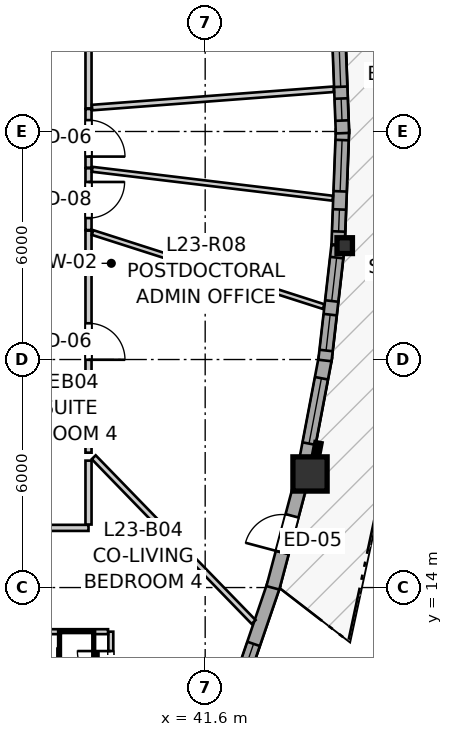
"""IFC4 building model, lengths in metres.
Left out: names, types, materials, properties, quantities, classifications, styles, units other than length and angle.
Written with IfcOpenShell. Run it as: python <this file> out.ifc"""

import sys

from ifc_helpers import new_model, si_unit, direction, frame, frame_2d, origin, origin_2d, place, context, subcontext, project, spatial, rectangle, i_section, extrude, source, transform, mapped, element, fill, save


model = new_model("IFC4")
c1 = context("Model", 3, precision=1e-05, world=origin(), true_north=direction((0.0, 1.0)))
c2 = subcontext(c1, "Body", "Model", "MODEL_VIEW")
j1 = project(units=[si_unit("LENGTHUNIT", "METRE"), si_unit("PLANEANGLEUNIT", "RADIAN")], contexts=[c1])
p1 = place(None, origin())
s1 = spatial("IfcSite", under=j1, at=p1, CompositionType="ELEMENT")
p2 = place(p1, origin())
s2 = spatial("IfcBuilding", under=s1, at=p2, CompositionType="ELEMENT")
p3 = place(p2, frame((0.0, 0.0, 80.0)))
s3 = spatial("IfcBuildingStorey", under=s2, at=p3, CompositionType="ELEMENT", Elevation=80.0)
m1 = source(origin(), c2, "Body", "SweptSolid", [
    extrude(rectangle(XDim=0.9, YDim=0.9, at=origin_2d()), origin(), (0.0, 0.0, 1.0), 2.935),
])
p4 = place(p3, frame((44.359, 16.989, 0.0), z_axis=(0.0, 0.0, 1.0), x_axis=(1.0, 0.0, 0.0)))
e1 = element("IfcColumn", 1, at=p4, inside=s3, PredefinedType="COLUMN", context=c2, shape_type="MappedRepresentation", body=[
    mapped(m1, transform((0.0, 0.0, 0.0), x_axis=(1.0, 0.0, 0.0), y_axis=(0.0, 1.0, 0.0), z_axis=(0.0, 0.0, 1.0), scale=1.0)),
])
m2 = source(origin(), c2, "Body", "SweptSolid", [
    extrude(i_section(OverallWidth=0.406, OverallDepth=0.416, WebThickness=0.027, FlangeThickness=0.044, FilletRadius=0.015, at=origin_2d()), origin(), (0.0, 0.0, 1.0), 2.935),
])
p5 = place(p3, frame((45.272, 22.996, 0.0), z_axis=(0.0, 0.0, 1.0), x_axis=(1.0, 0.0, 0.0)))
e2 = element("IfcColumn", 2, at=p5, inside=s3, PredefinedType="PILASTER", context=c2, shape_type="MappedRepresentation", body=[
    mapped(m2, transform((0.0, 0.0, 0.0), x_axis=(1.0, 0.0, 0.0), y_axis=(0.0, 1.0, 0.0), z_axis=(0.0, 0.0, 1.0), scale=1.0)),
])
p6 = place(p3, frame((42.373, 11.057, 0.0), z_axis=(0.0, 0.0, 1.0), x_axis=(0.323628226775, 0.946184321808, 0.0)))
e3 = element("IfcWall", 3, at=p6, inside=s3, PredefinedType="SOLIDWALL", context=c2, shape_type="SweptSolid", body=[
    extrude(rectangle(XDim=3.193, YDim=0.35, at=frame_2d((1.596, 0.0))), origin(), (0.0, 0.0, 1.0), 2.465),
])
p7 = place(p6, frame((0.595, 0.0, 0.82)))
e4 = element("IfcOpeningElement", 4, at=p7, cuts=e3, PredefinedType="OPENING", context=c2, shape_type="SweptSolid", body=[
    extrude(rectangle(XDim=0.95, YDim=1.35, at=frame_2d((0.475, 0.675))), frame((0.0, 0.185, 0.0), z_axis=(0.0, -1.0, 0.0), x_axis=(1.0, 0.0, 0.0)), (0.0, 0.0, 1.0), 0.37),
])
p8 = place(p3, frame((43.381, 13.993, 0.0), z_axis=(0.0, 0.0, 1.0), x_axis=(0.257079998736, 0.966390125286, 0.0)))
e5 = element("IfcWall", 5, at=p8, inside=s3, PredefinedType="SOLIDWALL", context=c2, shape_type="SweptSolid", body=[
    extrude(rectangle(XDim=2.921, YDim=0.35, at=frame_2d((1.46, 0.0))), origin(), (0.0, 0.0, 1.0), 2.465),
])
p9 = place(p8, frame((0.961, 0.0, 0.0)))
e6 = element("IfcOpeningElement", 6, at=p9, cuts=e5, PredefinedType="OPENING", context=c2, shape_type="SweptSolid", body=[
    extrude(rectangle(XDim=1.0, YDim=2.1, at=frame_2d((0.5, 1.05))), frame((0.0, 0.185, 0.0), z_axis=(0.0, -1.0, 0.0), x_axis=(1.0, 0.0, 0.0)), (0.0, 0.0, 1.0), 0.37),
])
p10 = place(p3, frame((44.229, 17.242, 0.0), z_axis=(0.0, 0.0, 1.0), x_axis=(0.186588413417, 0.982438173107, 0.0)))
e7 = element("IfcWall", 7, at=p10, inside=s3, PredefinedType="SOLIDWALL", context=c2, shape_type="SweptSolid", body=[
    extrude(rectangle(XDim=2.871, YDim=0.35, at=frame_2d((1.436, 0.0))), origin(), (0.0, 0.0, 1.0), 2.465),
])
p11 = place(p10, frame((0.555, 0.0, 0.82)))
e8 = element("IfcOpeningElement", 8, at=p11, cuts=e7, PredefinedType="OPENING", context=c2, shape_type="SweptSolid", body=[
    extrude(rectangle(XDim=1.75, YDim=1.3, at=frame_2d((0.875, 0.65))), frame((0.0, 0.185, 0.0), z_axis=(0.0, -1.0, 0.0), x_axis=(1.0, 0.0, 0.0)), (0.0, 0.0, 1.0), 0.37),
])
p12 = place(p3, frame((44.751, 19.975, 0.0), z_axis=(0.0, 0.0, 1.0), x_axis=(0.113356399423, 0.993554390413, 0.0)))
e9 = element("IfcWall", 9, at=p12, inside=s3, PredefinedType="SOLIDWALL", context=c2, shape_type="SweptSolid", body=[
    extrude(rectangle(XDim=3.041, YDim=0.35, at=frame_2d((1.521, 0.0))), origin(), (0.0, 0.0, 1.0), 2.465),
])
p13 = place(p12, frame((0.264, 0.0, 0.82)))
e10 = element("IfcOpeningElement", 10, at=p13, cuts=e9, PredefinedType="OPENING", context=c2, shape_type="SweptSolid", body=[
    extrude(rectangle(XDim=0.95, YDim=1.35, at=frame_2d((0.475, 0.675))), frame((0.0, 0.185, 0.0), z_axis=(0.0, -1.0, 0.0), x_axis=(1.0, 0.0, 0.0)), (0.0, 0.0, 1.0), 0.37),
])
p14 = place(p12, frame((1.575, 0.0, 0.82)))
e11 = element("IfcOpeningElement", 11, at=p14, cuts=e9, PredefinedType="OPENING", context=c2, shape_type="SweptSolid", body=[
    extrude(rectangle(XDim=1.15, YDim=1.2, at=frame_2d((0.575, 0.6))), frame((0.0, 0.185, 0.0), z_axis=(0.0, -1.0, 0.0), x_axis=(1.0, 0.0, 0.0)), (0.0, 0.0, 1.0), 0.37),
])
p15 = place(p3, frame((45.098, 23.023, 0.0), z_axis=(0.0, 0.0, 1.0), x_axis=(0.037943250197, 0.999279895607, 0.0)))
e12 = element("IfcWall", 12, at=p15, inside=s3, PredefinedType="SOLIDWALL", context=c2, shape_type="SweptSolid", body=[
    extrude(rectangle(XDim=3.024, YDim=0.35, at=frame_2d((1.512, 0.0))), origin(), (0.0, 0.0, 1.0), 2.465),
])
p16 = place(p15, frame((0.346, 0.0, 0.82)))
e13 = element("IfcOpeningElement", 13, at=p16, cuts=e12, PredefinedType="OPENING", context=c2, shape_type="SweptSolid", body=[
    extrude(rectangle(XDim=0.58, YDim=1.35, at=frame_2d((0.29, 0.675))), frame((0.0, 0.185, 0.0), z_axis=(0.0, -1.0, 0.0), x_axis=(1.0, 0.0, 0.0)), (0.0, 0.0, 1.0), 0.37),
])
p17 = place(p15, frame((1.404, 0.0, 0.82)))
e14 = element("IfcOpeningElement", 14, at=p17, cuts=e12, PredefinedType="OPENING", context=c2, shape_type="SweptSolid", body=[
    extrude(rectangle(XDim=1.35, YDim=1.45, at=frame_2d((0.675, 0.725))), frame((0.0, 0.185, 0.0), z_axis=(0.0, -1.0, 0.0), x_axis=(1.0, 0.0, 0.0)), (0.0, 0.0, 1.0), 0.37),
])
p18 = place(p3, frame((45.213, 25.955, 0.0), z_axis=(0.0, 0.0, 1.0), x_axis=(-0.037934195255, 0.999280239388, 0.0)))
e15 = element("IfcWall", 15, at=p18, inside=s3, PredefinedType="SOLIDWALL", context=c2, shape_type="SweptSolid", body=[
    extrude(rectangle(XDim=2.819, YDim=0.35, at=frame_2d((1.409, 0.0))), origin(), (0.0, 0.0, 1.0), 2.465),
])
p19 = place(p18, frame((0.332, 0.0, 0.82)))
e16 = element("IfcOpeningElement", 16, at=p19, cuts=e15, PredefinedType="OPENING", context=c2, shape_type="SweptSolid", body=[
    extrude(rectangle(XDim=0.58, YDim=1.35, at=frame_2d((0.29, 0.675))), frame((0.0, 0.185, 0.0), z_axis=(0.0, -1.0, 0.0), x_axis=(1.0, 0.0, 0.0)), (0.0, 0.0, 1.0), 0.37),
])
p20 = place(p18, frame((1.222, 0.0, 0.82)))
e17 = element("IfcOpeningElement", 17, at=p20, cuts=e15, PredefinedType="OPENING", context=c2, shape_type="SweptSolid", body=[
    extrude(rectangle(XDim=1.15, YDim=1.2, at=frame_2d((0.575, 0.6))), frame((0.0, 0.185, 0.0), z_axis=(0.0, -1.0, 0.0), x_axis=(1.0, 0.0, 0.0)), (0.0, 0.0, 1.0), 0.37),
])
p21 = place(p3, frame((38.53, 23.392, 0.0), z_axis=(0.0, 0.0, 1.0), x_axis=(0.0, -1.0, 0.0)))
e18 = element("IfcWall", 18, at=p21, inside=s3, PredefinedType="PARTITIONING", context=c2, shape_type="SweptSolid", body=[
    extrude(rectangle(XDim=5.843, YDim=0.16, at=frame_2d((2.921, 0.0))), origin(), (0.0, 0.0, 1.0), 2.935),
])
p22 = place(p21, frame((2.438, 0.0, 0.0)))
e19 = element("IfcOpeningElement", 19, at=p22, cuts=e18, PredefinedType="OPENING", context=c2, shape_type="SweptSolid", body=[
    extrude(rectangle(XDim=0.96, YDim=2.1, at=frame_2d((0.48, 1.05))), frame((0.0, 0.09, 0.0), z_axis=(0.0, -1.0, 0.0), x_axis=(1.0, 0.0, 0.0)), (0.0, 0.0, 1.0), 0.18),
])
p23 = place(p3, frame((38.53, 31.856, 0.0), z_axis=(0.0, 0.0, 1.0), x_axis=(0.0, -1.0, 0.0)))
e20 = element("IfcWall", 20, at=p23, inside=s3, PredefinedType="PARTITIONING", context=c2, shape_type="SweptSolid", body=[
    extrude(rectangle(XDim=5.249, YDim=0.16, at=frame_2d((2.625, 0.0))), origin(), (0.0, 0.0, 1.0), 2.935),
])
p24 = place(p23, frame((2.146, 0.0, 0.0)))
e21 = element("IfcOpeningElement", 21, at=p24, cuts=e20, PredefinedType="OPENING", context=c2, shape_type="SweptSolid", body=[
    extrude(rectangle(XDim=0.96, YDim=2.1, at=frame_2d((0.48, 1.05))), frame((0.0, 0.09, 0.0), z_axis=(0.0, -1.0, 0.0), x_axis=(1.0, 0.0, 0.0)), (0.0, 0.0, 1.0), 0.18),
])
p25 = place(p3, frame((38.53, 15.57, 0.0), z_axis=(0.0, 0.0, 1.0), x_axis=(-1.0, 0.0, 0.0)))
e22 = element("IfcWall", 22, at=p25, inside=s3, PredefinedType="PARTITIONING", context=c2, shape_type="SweptSolid", body=[
    extrude(rectangle(XDim=3.257, YDim=0.16, at=frame_2d((1.628, 0.0))), origin(), (0.0, 0.0, 1.0), 2.935),
])
p26 = place(p25, frame((1.16, 0.0, 0.0)))
e23 = element("IfcOpeningElement", 23, at=p26, cuts=e22, PredefinedType="OPENING", context=c2, shape_type="SweptSolid", body=[
    extrude(rectangle(XDim=0.92, YDim=2.1, at=frame_2d((0.46, 1.05))), frame((0.0, 0.09, 0.0), z_axis=(0.0, -1.0, 0.0), x_axis=(1.0, 0.0, 0.0)), (0.0, 0.0, 1.0), 0.18),
])
p27 = place(p3, frame((39.117, 10.939, 0.0), z_axis=(0.0, 0.0, 1.0), x_axis=(0.0, 1.0, 0.0)))
e24 = element("IfcWall", 24, at=p27, inside=s3, PredefinedType="PARTITIONING", context=c2, shape_type="SweptSolid", body=[
    extrude(rectangle(XDim=1.9, YDim=0.13, at=frame_2d((0.95, 0.0))), origin(), (0.0, 0.0, 1.0), 2.935),
])
p28 = place(p27, frame((0.51, 0.0, 0.0)))
e25 = element("IfcOpeningElement", 25, at=p28, cuts=e24, PredefinedType="OPENING", context=c2, shape_type="SweptSolid", body=[
    extrude(rectangle(XDim=0.88, YDim=2.05, at=frame_2d((0.44, 1.025))), frame((0.0, 0.075, 0.0), z_axis=(0.0, -1.0, 0.0), x_axis=(1.0, 0.0, 0.0)), (0.0, 0.0, 1.0), 0.15),
])
p29 = place(p3, frame((38.53, 25.032, 0.0), z_axis=(0.0, 0.0, 1.0), x_axis=(0.0, -1.0, 0.0)))
e26 = element("IfcWall", 26, at=p29, inside=s3, PredefinedType="PARTITIONING", context=c2, shape_type="SweptSolid", body=[
    extrude(rectangle(XDim=1.625, YDim=0.16, at=frame_2d((0.812, 0.0))), origin(), (0.0, 0.0, 1.0), 2.935),
])
p30 = place(p29, frame((0.361, 0.0, 0.0)))
e27 = element("IfcOpeningElement", 27, at=p30, cuts=e26, PredefinedType="OPENING", context=c2, shape_type="SweptSolid", body=[
    extrude(rectangle(XDim=0.95, YDim=2.1, at=frame_2d((0.475, 1.05))), frame((0.0, 0.09, 0.0), z_axis=(0.0, -1.0, 0.0), x_axis=(1.0, 0.0, 0.0)), (0.0, 0.0, 1.0), 0.18),
])
p31 = place(p3, frame((38.53, 26.592, 0.0), z_axis=(0.0, 0.0, 1.0), x_axis=(0.0, -1.0, 0.0)))
e28 = element("IfcWall", 28, at=p31, inside=s3, PredefinedType="PARTITIONING", context=c2, shape_type="SweptSolid", body=[
    extrude(rectangle(XDim=1.545, YDim=0.16, at=frame_2d((0.772, 0.0))), origin(), (0.0, 0.0, 1.0), 2.935),
])
p32 = place(p31, frame((0.292, 0.0, 0.0)))
e29 = element("IfcOpeningElement", 29, at=p32, cuts=e28, PredefinedType="OPENING", context=c2, shape_type="SweptSolid", body=[
    extrude(rectangle(XDim=0.96, YDim=2.1, at=frame_2d((0.48, 1.05))), frame((0.0, 0.09, 0.0), z_axis=(0.0, -1.0, 0.0), x_axis=(1.0, 0.0, 0.0)), (0.0, 0.0, 1.0), 0.18),
])
p33 = place(p3, frame((38.637, 23.342, 0.0), z_axis=(0.0, 0.0, 1.0), x_axis=(0.952253923936, -0.305307163933, 0.0)))
e30 = element("IfcWall", 30, at=p33, inside=s3, PredefinedType="PARTITIONING", context=c2, shape_type="SweptSolid", body=[
    extrude(rectangle(XDim=6.384, YDim=0.13, at=frame_2d((3.192, 0.0))), origin(), (0.0, 0.0, 1.0), 2.935),
])
p34 = place(p3, frame((38.626, 25.006, 0.0), z_axis=(0.0, 0.0, 1.0), x_axis=(0.992837647249, -0.11947136144, 0.0)))
e31 = element("IfcWall", 31, at=p34, inside=s3, PredefinedType="PARTITIONING", context=c2, shape_type="SweptSolid", body=[
    extrude(rectangle(XDim=6.376, YDim=0.13, at=frame_2d((3.188, 0.0))), origin(), (0.0, 0.0, 1.0), 2.935),
])
p35 = place(p3, frame((38.624, 26.629, 0.0), z_axis=(0.0, 0.0, 1.0), x_axis=(0.997137880159, 0.075604549805, 0.0)))
e32 = element("IfcWall", 32, at=p35, inside=s3, PredefinedType="PARTITIONING", context=c2, shape_type="SweptSolid", body=[
    extrude(rectangle(XDim=6.378, YDim=0.145, at=frame_2d((3.189, 0.0))), origin(), (0.0, 0.0, 1.0), 2.935),
])
p36 = place(p3, frame((38.667, 17.429, 0.0), z_axis=(0.0, 0.0, 1.0), x_axis=(0.696417222112, -0.717637131666, 0.0)))
e33 = element("IfcWall", 33, at=p36, inside=s3, PredefinedType="PARTITIONING", context=c2, shape_type="SweptSolid", body=[
    extrude(rectangle(XDim=6.04, YDim=0.145, at=frame_2d((3.02, 0.0))), origin(), (0.0, 0.0, 1.0), 2.935),
])
p37 = place(p3, frame((38.53, 15.658, 0.0), z_axis=(0.0, 0.0, 1.0), x_axis=(0.0, 1.0, 0.0)))
e34 = element("IfcWall", 34, at=p37, inside=s3, PredefinedType="PARTITIONING", context=c2, shape_type="SweptSolid", body=[
    extrude(rectangle(XDim=1.682, YDim=0.16, at=frame_2d((0.841, 0.0))), origin(), (0.0, 0.0, 1.0), 2.935),
])
p38 = place(p3, frame((37.317, 12.839, 0.0), z_axis=(0.0, 0.0, 1.0), x_axis=(1.0, 0.0, 0.0)))
e35 = element("IfcWall", 35, at=p38, inside=s3, PredefinedType="PARTITIONING", context=c2, shape_type="SweptSolid", body=[
    extrude(rectangle(XDim=1.727, YDim=0.13, at=frame_2d((0.864, 0.0))), origin(), (0.0, 0.0, 1.0), 2.935),
])
m3 = source(origin(), c2, "Body", "SweptSolid", [
    extrude(rectangle(XDim=0.95, YDim=1.35, at=frame_2d((0.475, 0.675))), frame((0.0, 0.03, 0.0), z_axis=(0.0, -1.0, 0.0), x_axis=(1.0, 0.0, 0.0)), (0.0, 0.0, 1.0), 0.06),
])
p39 = place(p7, origin())
e36 = element("IfcWindow", 36, at=p39, inside=s3, PartitioningType="SINGLE_PANEL", PredefinedType="WINDOW", context=c2, shape_type="MappedRepresentation", body=[
    mapped(m3, transform((0.0, 0.0, 0.0), x_axis=(1.0, 0.0, 0.0), y_axis=(0.0, 1.0, 0.0), z_axis=(0.0, 0.0, 1.0), scale=1.0)),
])
fill(e4, e36)
m4 = source(origin(), c2, "Body", "SweptSolid", [
    extrude(rectangle(XDim=1.75, YDim=1.3, at=frame_2d((0.875, 0.65))), frame((0.0, 0.03, 0.0), z_axis=(0.0, -1.0, 0.0), x_axis=(1.0, 0.0, 0.0)), (0.0, 0.0, 1.0), 0.06),
])
p40 = place(p11, origin())
e37 = element("IfcWindow", 37, at=p40, inside=s3, PartitioningType="SINGLE_PANEL", PredefinedType="WINDOW", context=c2, shape_type="MappedRepresentation", body=[
    mapped(m4, transform((0.0, 0.0, 0.0), x_axis=(1.0, 0.0, 0.0), y_axis=(0.0, 1.0, 0.0), z_axis=(0.0, 0.0, 1.0), scale=1.0)),
])
fill(e8, e37)
p41 = place(p13, origin())
e38 = element("IfcWindow", 38, at=p41, inside=s3, PartitioningType="SINGLE_PANEL", PredefinedType="WINDOW", context=c2, shape_type="MappedRepresentation", body=[
    mapped(m3, transform((0.0, 0.0, 0.0), x_axis=(1.0, 0.0, 0.0), y_axis=(0.0, 1.0, 0.0), z_axis=(0.0, 0.0, 1.0), scale=1.0)),
])
fill(e10, e38)
m5 = source(origin(), c2, "Body", "SweptSolid", [
    extrude(rectangle(XDim=1.15, YDim=1.2, at=frame_2d((0.575, 0.6))), frame((0.0, 0.03, 0.0), z_axis=(0.0, -1.0, 0.0), x_axis=(1.0, 0.0, 0.0)), (0.0, 0.0, 1.0), 0.06),
])
p42 = place(p14, origin())
e39 = element("IfcWindow", 39, at=p42, inside=s3, PartitioningType="SINGLE_PANEL", PredefinedType="WINDOW", context=c2, shape_type="MappedRepresentation", body=[
    mapped(m5, transform((0.0, 0.0, 0.0), x_axis=(1.0, 0.0, 0.0), y_axis=(0.0, 1.0, 0.0), z_axis=(0.0, 0.0, 1.0), scale=1.0)),
])
fill(e11, e39)
m6 = source(origin(), c2, "Body", "SweptSolid", [
    extrude(rectangle(XDim=0.58, YDim=1.35, at=frame_2d((0.29, 0.675))), frame((0.0, 0.03, 0.0), z_axis=(0.0, -1.0, 0.0), x_axis=(1.0, 0.0, 0.0)), (0.0, 0.0, 1.0), 0.06),
])
p43 = place(p16, origin())
e40 = element("IfcWindow", 40, at=p43, inside=s3, PartitioningType="SINGLE_PANEL", PredefinedType="WINDOW", context=c2, shape_type="MappedRepresentation", body=[
    mapped(m6, transform((0.0, 0.0, 0.0), x_axis=(1.0, 0.0, 0.0), y_axis=(0.0, 1.0, 0.0), z_axis=(0.0, 0.0, 1.0), scale=1.0)),
])
fill(e13, e40)
m7 = source(origin(), c2, "Body", "SweptSolid", [
    extrude(rectangle(XDim=1.35, YDim=1.45, at=frame_2d((0.675, 0.725))), frame((0.0, 0.03, 0.0), z_axis=(0.0, -1.0, 0.0), x_axis=(1.0, 0.0, 0.0)), (0.0, 0.0, 1.0), 0.06),
])
p44 = place(p17, origin())
e41 = element("IfcWindow", 41, at=p44, inside=s3, PartitioningType="SINGLE_PANEL", PredefinedType="WINDOW", context=c2, shape_type="MappedRepresentation", body=[
    mapped(m7, transform((0.0, 0.0, 0.0), x_axis=(1.0, 0.0, 0.0), y_axis=(0.0, 1.0, 0.0), z_axis=(0.0, 0.0, 1.0), scale=1.0)),
])
fill(e14, e41)
p45 = place(p19, origin())
e42 = element("IfcWindow", 42, at=p45, inside=s3, PartitioningType="SINGLE_PANEL", PredefinedType="WINDOW", context=c2, shape_type="MappedRepresentation", body=[
    mapped(m6, transform((0.0, 0.0, 0.0), x_axis=(1.0, 0.0, 0.0), y_axis=(0.0, 1.0, 0.0), z_axis=(0.0, 0.0, 1.0), scale=1.0)),
])
fill(e16, e42)
p46 = place(p20, origin())
e43 = element("IfcWindow", 43, at=p46, inside=s3, PartitioningType="SINGLE_PANEL", PredefinedType="WINDOW", context=c2, shape_type="MappedRepresentation", body=[
    mapped(m5, transform((0.0, 0.0, 0.0), x_axis=(1.0, 0.0, 0.0), y_axis=(0.0, 1.0, 0.0), z_axis=(0.0, 0.0, 1.0), scale=1.0)),
])
fill(e17, e43)
m8 = source(origin(), c2, "Body", "SweptSolid", [
    extrude(rectangle(XDim=1.0, YDim=2.1, at=frame_2d((0.5, 1.05))), frame((0.0, 0.025, 0.0), z_axis=(0.0, -1.0, 0.0), x_axis=(1.0, 0.0, 0.0)), (0.0, 0.0, 1.0), 0.05),
])
p47 = place(p9, origin())
e44 = element("IfcDoor", 44, at=p47, inside=s3, OperationType="SINGLE_SWING_LEFT", PredefinedType="DOOR", context=c2, shape_type="MappedRepresentation", body=[
    mapped(m8, transform((0.0, 0.0, 0.0), x_axis=(1.0, 0.0, 0.0), y_axis=(0.0, 1.0, 0.0), z_axis=(0.0, 0.0, 1.0), scale=1.0)),
])
fill(e6, e44)
m9 = source(origin(), c2, "Body", "SweptSolid", [
    extrude(rectangle(XDim=0.96, YDim=2.1, at=frame_2d((0.48, 1.05))), frame((0.0, 0.025, 0.0), z_axis=(0.0, -1.0, 0.0), x_axis=(1.0, 0.0, 0.0)), (0.0, 0.0, 1.0), 0.05),
])
p48 = place(p22, origin())
e45 = element("IfcDoor", 45, at=p48, inside=s3, OperationType="SINGLE_SWING_RIGHT", PredefinedType="DOOR", context=c2, shape_type="MappedRepresentation", body=[
    mapped(m9, transform((0.0, 0.0, 0.0), x_axis=(1.0, 0.0, 0.0), y_axis=(0.0, 1.0, 0.0), z_axis=(0.0, 0.0, 1.0), scale=1.0)),
])
fill(e19, e45)
m10 = source(origin(), c2, "Body", "SweptSolid", [
    extrude(rectangle(XDim=0.88, YDim=2.05, at=frame_2d((0.44, 1.025))), frame((0.0, 0.025, 0.0), z_axis=(0.0, -1.0, 0.0), x_axis=(1.0, 0.0, 0.0)), (0.0, 0.0, 1.0), 0.05),
])
p49 = place(p28, origin())
e46 = element("IfcDoor", 46, at=p49, inside=s3, OperationType="SINGLE_SWING_RIGHT", PredefinedType="DOOR", context=c2, shape_type="MappedRepresentation", body=[
    mapped(m10, transform((0.0, 0.0, 0.0), x_axis=(1.0, 0.0, 0.0), y_axis=(0.0, 1.0, 0.0), z_axis=(0.0, 0.0, 1.0), scale=1.0)),
])
fill(e25, e46)
m11 = source(origin(), c2, "Body", "SweptSolid", [
    extrude(rectangle(XDim=0.95, YDim=2.1, at=frame_2d((0.475, 1.05))), frame((0.0, 0.025, 0.0), z_axis=(0.0, -1.0, 0.0), x_axis=(1.0, 0.0, 0.0)), (0.0, 0.0, 1.0), 0.05),
])
p50 = place(p30, origin())
e47 = element("IfcDoor", 47, at=p50, inside=s3, OperationType="SINGLE_SWING_LEFT", PredefinedType="DOOR", context=c2, shape_type="MappedRepresentation", body=[
    mapped(m11, transform((0.0, 0.0, 0.0), x_axis=(1.0, 0.0, 0.0), y_axis=(0.0, 1.0, 0.0), z_axis=(0.0, 0.0, 1.0), scale=1.0)),
])
fill(e27, e47)
p51 = place(p32, origin())
e48 = element("IfcDoor", 48, at=p51, inside=s3, OperationType="SINGLE_SWING_RIGHT", PredefinedType="DOOR", context=c2, shape_type="MappedRepresentation", body=[
    mapped(m9, transform((0.0, 0.0, 0.0), x_axis=(1.0, 0.0, 0.0), y_axis=(0.0, 1.0, 0.0), z_axis=(0.0, 0.0, 1.0), scale=1.0)),
])
fill(e29, e48)
save(model, sys.argv[1])
